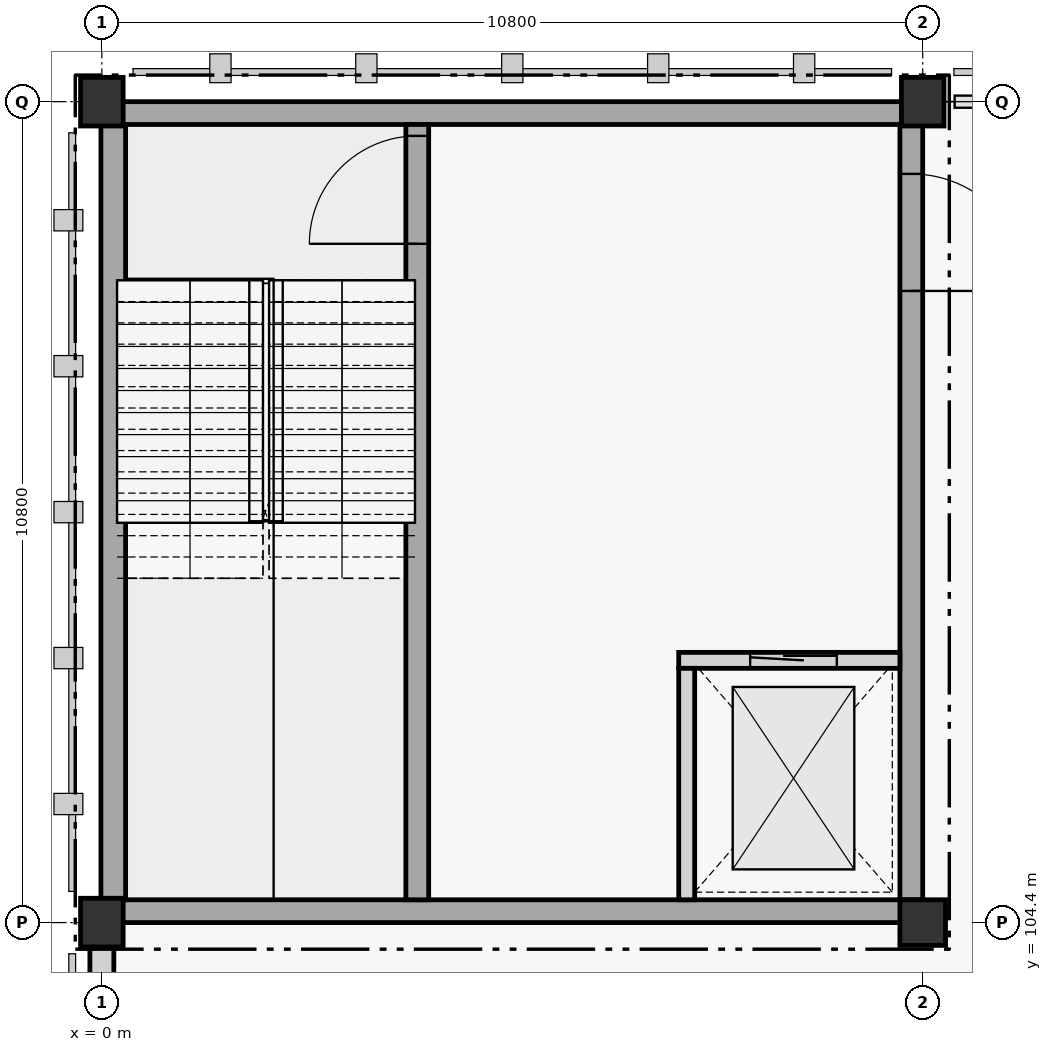
"""IFC4 building model, lengths in metres.
Left out: names, types, materials, properties, quantities, classifications, styles, units other than length and angle.
Written with IfcOpenShell. Run it as: python <this file> out.ifc"""

import sys

from ifc_helpers import new_model, si_unit, direction, frame, frame_2d, origin, origin_2d, place, context, subcontext, project, spatial, rectangle, extrude, element, fill, save


model = new_model("IFC4")
c1 = context("Model", 3, precision=1e-05, world=origin(), true_north=direction((0.0, 1.0)))
c2 = subcontext(c1, "Body", "Model", "MODEL_VIEW")
j1 = project(units=[si_unit("LENGTHUNIT", "METRE"), si_unit("PLANEANGLEUNIT", "RADIAN")], contexts=[c1])
p1 = place(None, origin())
s1 = spatial("IfcSite", under=j1, at=p1, CompositionType="ELEMENT")
p2 = place(p1, origin())
s2 = spatial("IfcBuilding", under=s1, at=p2, CompositionType="ELEMENT")
p3 = place(p2, frame((0.0, 0.0, 10.8)))
s3 = spatial("IfcBuildingStorey", under=s2, at=p3, CompositionType="ELEMENT", Elevation=10.8)
for number, where, z_axis, x_axis in (
    (1, (0.0, 104.4, 0.0), (0.0, 0.0, 1.0), (1.0, 0.0, 0.0)),
    (2, (0.0, 115.2, 0.0), (0.0, 0.0, 1.0), (1.0, 0.0, 0.0)),
):
    element("IfcColumn", number, at=place(p3, frame(where, z_axis=z_axis, x_axis=x_axis)), inside=s3, PredefinedType="COLUMN", context=c2, shape_type="SweptSolid", body=[
        extrude(rectangle(XDim=0.56, YDim=0.64, at=origin_2d()), origin(), (0.0, 0.0, 1.0), 4.2),
    ])
p4 = place(p3, frame((10.8, 104.4, 0.0), z_axis=(0.0, 0.0, 1.0), x_axis=(1.0, 0.0, 0.0)))
e3 = element("IfcColumn", 3, at=p4, inside=s3, PredefinedType="COLUMN", context=c2, shape_type="SweptSolid", body=[
    extrude(rectangle(XDim=0.6, YDim=0.6, at=origin_2d()), origin(), (0.0, 0.0, 1.0), 4.2),
])
p5 = place(p3, frame((10.8, 115.2, 0.0), z_axis=(0.0, 0.0, 1.0), x_axis=(1.0, 0.0, 0.0)))
e4 = element("IfcColumn", 4, at=p5, inside=s3, PredefinedType="COLUMN", context=c2, shape_type="SweptSolid", body=[
    extrude(rectangle(XDim=0.56, YDim=0.64, at=origin_2d()), origin(), (0.0, 0.0, 1.0), 4.2),
])
for number, where, z_axis, x_axis in (
    (5, (10.8, 104.55, 0.0), (0.0, 0.0, 1.0), (-1.0, 0.0, 0.0)),
    (6, (0.0, 115.05, 0.0), (0.0, 0.0, 1.0), (1.0, 0.0, 0.0)),
):
    element("IfcWall", number, at=place(p3, frame(where, z_axis=z_axis, x_axis=x_axis)), inside=s3, PredefinedType="SHEAR", context=c2, shape_type="SweptSolid", body=[
        extrude(rectangle(XDim=10.8, YDim=0.3, at=frame_2d((5.4, 0.0))), origin(), (0.0, 0.0, 1.0), 4.2),
    ])
p6 = place(p3, frame((0.15, 104.7, 0.0), z_axis=(0.0, 0.0, 1.0), x_axis=(0.0, 1.0, 0.0)))
e7 = element("IfcWall", 7, at=p6, inside=s3, PredefinedType="SHEAR", context=c2, shape_type="SweptSolid", body=[
    extrude(rectangle(XDim=10.2, YDim=0.325, at=frame_2d((5.1, 0.0))), origin(), (0.0, 0.0, 1.0), 4.2),
])
p7 = place(p3, frame((10.65, 114.9, 0.0), z_axis=(0.0, 0.0, 1.0), x_axis=(0.0, -1.0, 0.0)))
e8 = element("IfcWall", 8, at=p7, inside=s3, PredefinedType="SHEAR", context=c2, shape_type="SweptSolid", body=[
    extrude(rectangle(XDim=10.2, YDim=0.3, at=frame_2d((5.1, 0.0))), origin(), (0.0, 0.0, 1.0), 4.2),
])
p8 = place(p7, frame((0.65, 0.0, 0.0)))
e9 = element("IfcOpeningElement", 9, at=p8, cuts=e8, PredefinedType="OPENING", context=c2, shape_type="SweptSolid", body=[
    extrude(rectangle(XDim=1.54, YDim=2.22, at=frame_2d((0.77, 1.11))), frame((0.0, 0.15, 0.0), z_axis=(0.0, -1.0, 0.0), x_axis=(1.0, 0.0, 0.0)), (0.0, 0.0, 1.0), 0.3),
])
p9 = place(p3, frame((4.15, 104.7, 0.0), z_axis=(0.0, 0.0, 1.0), x_axis=(0.0, 1.0, 0.0)))
e10 = element("IfcWall", 10, at=p9, inside=s3, PredefinedType="SHEAR", context=c2, shape_type="SweptSolid", body=[
    extrude(rectangle(XDim=10.2, YDim=0.3, at=frame_2d((5.1, 0.0))), origin(), (0.0, 0.0, 1.0), 4.2),
])
p10 = place(p9, frame((8.63, 0.0, 0.0)))
e11 = element("IfcOpeningElement", 11, at=p10, cuts=e10, PredefinedType="OPENING", context=c2, shape_type="SweptSolid", body=[
    extrude(rectangle(XDim=1.42, YDim=2.2, at=frame_2d((0.71, 1.1))), frame((0.0, 0.15, 0.0), z_axis=(0.0, -1.0, 0.0), x_axis=(1.0, 0.0, 0.0)), (0.0, 0.0, 1.0), 0.3),
])
p11 = place(p3, frame((0.0, 97.516, 0.0), z_axis=(0.0, 0.0, 1.0), x_axis=(0.0, 1.0, 0.0)))
e12 = element("IfcWall", 12, at=p11, inside=s3, PredefinedType="STANDARD", context=c2, shape_type="SweptSolid", body=[
    extrude(rectangle(XDim=6.568, YDim=0.315, at=frame_2d((3.284, 0.0))), origin(), (0.0, 0.0, 1.0), 3.335),
])
p12 = place(p11, frame((1.974, 0.0, 0.9)))
e13 = element("IfcOpeningElement", 13, at=p12, cuts=e12, PredefinedType="OPENING", context=c2, shape_type="SweptSolid", body=[
    extrude(rectangle(XDim=2.62, YDim=2.24, at=frame_2d((1.31, 1.12))), frame((0.0, 0.157, 0.0), z_axis=(0.0, -1.0, 0.0), x_axis=(1.0, 0.0, 0.0)), (0.0, 0.0, 1.0), 0.315),
])
p13 = place(p3, frame((7.59, 107.85, 0.0), z_axis=(0.0, 0.0, 1.0), x_axis=(1.0, 0.0, 0.0)))
e14 = element("IfcWall", 14, at=p13, inside=s3, PredefinedType="STANDARD", context=c2, shape_type="SweptSolid", body=[
    extrude(rectangle(XDim=2.91, YDim=0.21, at=frame_2d((1.455, 0.0))), origin(), (0.0, 0.0, 1.0), 4.2),
])
p14 = place(p13, frame((0.94, 0.0, 0.0)))
e15 = element("IfcOpeningElement", 15, at=p14, cuts=e14, PredefinedType="OPENING", context=c2, shape_type="SweptSolid", body=[
    extrude(rectangle(XDim=1.14, YDim=2.16, at=frame_2d((0.57, 1.08))), frame((0.0, 0.105, 0.0), z_axis=(0.0, -1.0, 0.0), x_axis=(1.0, 0.0, 0.0)), (0.0, 0.0, 1.0), 0.21),
])
p15 = place(p3, frame((7.695, 104.7, 0.0), z_axis=(0.0, 0.0, 1.0), x_axis=(0.0, 1.0, 0.0)))
e16 = element("IfcWall", 16, at=p15, inside=s3, PredefinedType="STANDARD", context=c2, shape_type="SweptSolid", body=[
    extrude(rectangle(XDim=3.045, YDim=0.21, at=frame_2d((1.522, 0.0))), origin(), (0.0, 0.0, 1.0), 4.2),
])
p16 = place(p14, origin())
e17 = element("IfcDoor", 17, at=p16, inside=s3, OperationType="SLIDING_TO_LEFT", PredefinedType="DOOR", context=c2, shape_type="SweptSolid", body=[
    extrude(rectangle(XDim=1.14, YDim=2.16, at=frame_2d((0.57, 1.08))), frame((0.0, 0.025, 0.0), z_axis=(0.0, -1.0, 0.0), x_axis=(1.0, 0.0, 0.0)), (0.0, 0.0, 1.0), 0.05),
])
fill(e15, e17)
p17 = place(p10, origin())
e18 = element("IfcDoor", 18, at=p17, inside=s3, OperationType="SINGLE_SWING_LEFT", PredefinedType="DOOR", context=c2, shape_type="SweptSolid", body=[
    extrude(rectangle(XDim=1.42, YDim=2.2, at=frame_2d((0.71, 1.1))), frame((0.0, 0.025, 0.0), z_axis=(0.0, -1.0, 0.0), x_axis=(1.0, 0.0, 0.0)), (0.0, 0.0, 1.0), 0.05),
])
fill(e11, e18)
p18 = place(p8, origin())
e19 = element("IfcDoor", 19, at=p18, inside=s3, OperationType="SINGLE_SWING_RIGHT", PredefinedType="DOOR", context=c2, shape_type="SweptSolid", body=[
    extrude(rectangle(XDim=1.54, YDim=2.22, at=frame_2d((0.77, 1.11))), frame((0.0, 0.025, 0.0), z_axis=(0.0, -1.0, 0.0), x_axis=(1.0, 0.0, 0.0)), (0.0, 0.0, 1.0), 0.05),
])
fill(e9, e19)
save(model, sys.argv[1])
